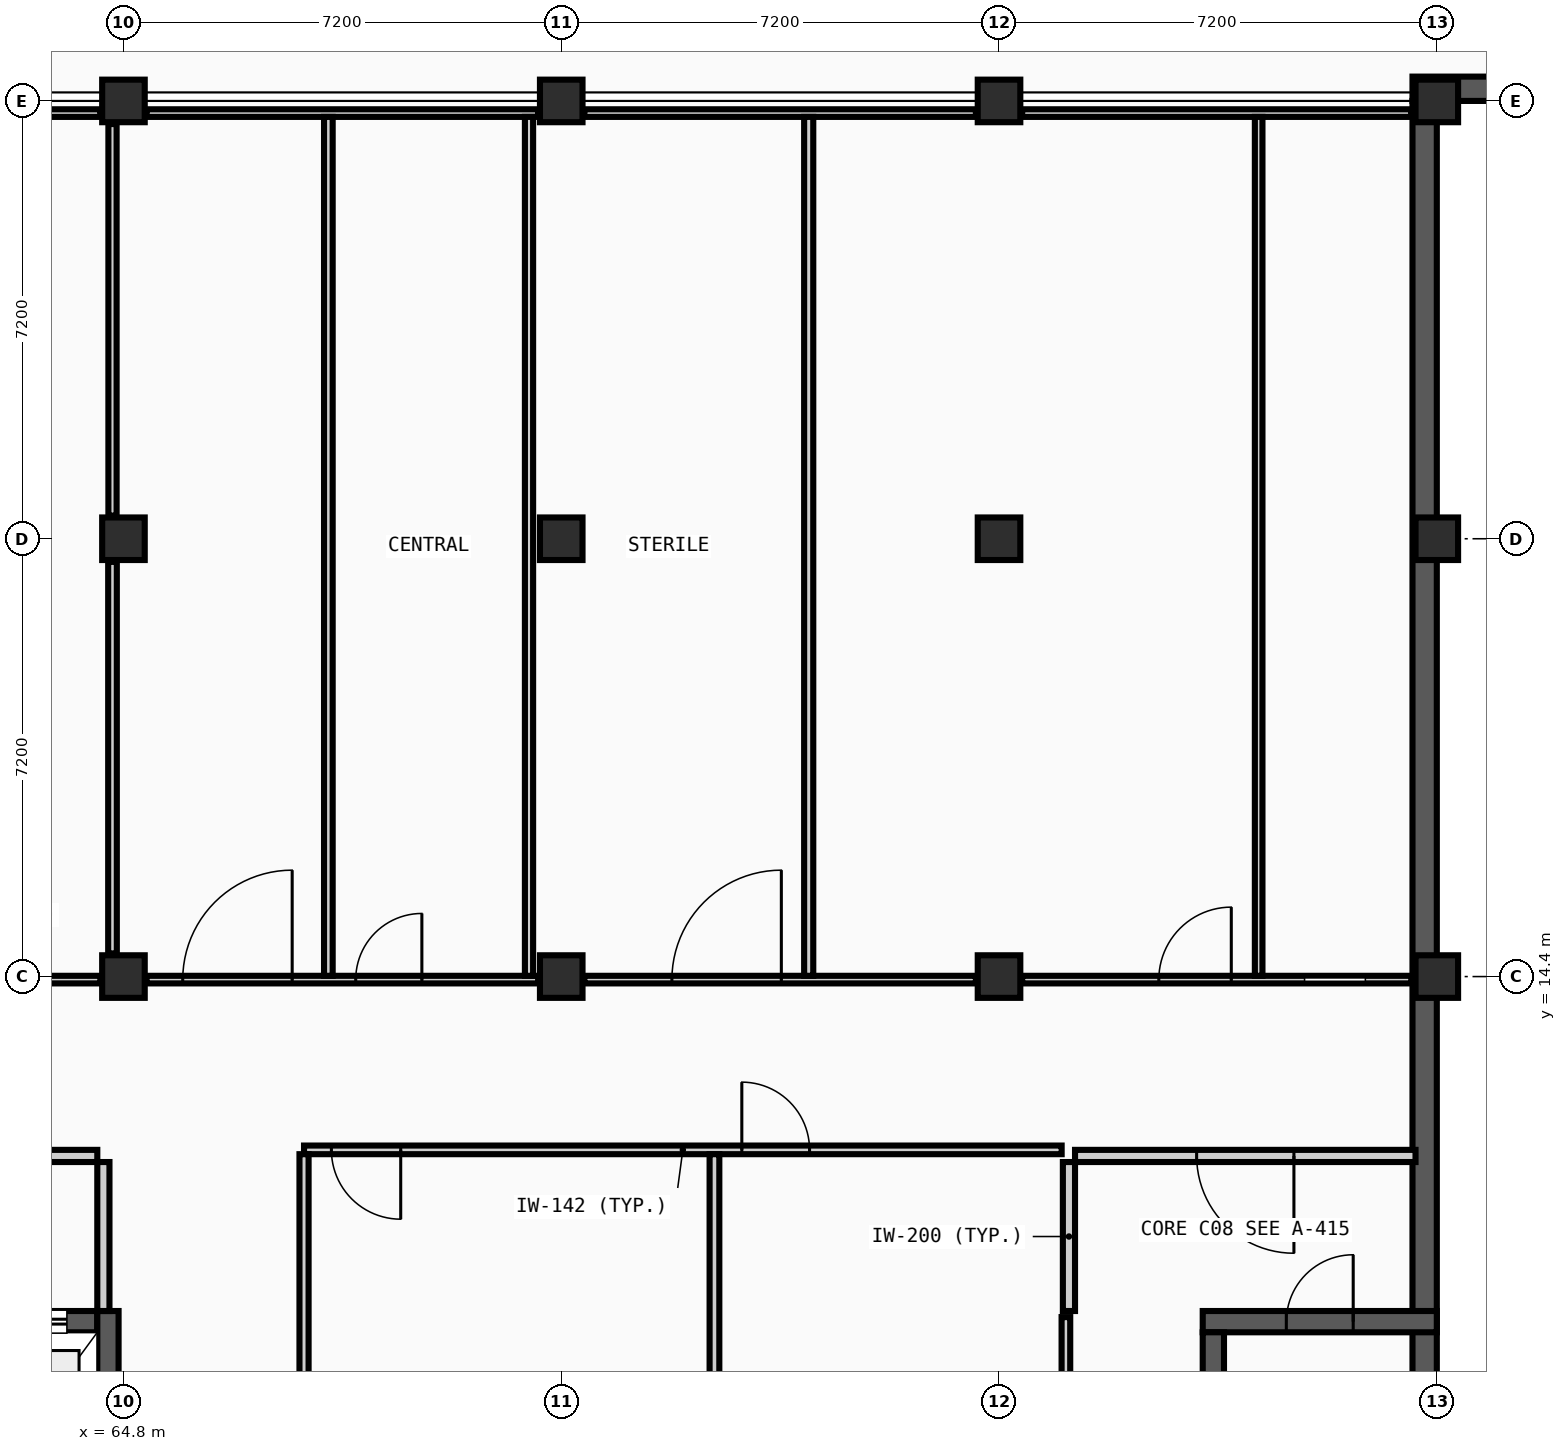
"""IFC4 building model, lengths in metres.
Left out: names, types, materials, properties, quantities, classifications, styles, units other than length and angle.
Written with IfcOpenShell. Run it as: python <this file> out.ifc"""

import sys

from ifc_helpers import new_model, si_unit, direction, frame, frame_2d, origin, origin_2d, place, context, subcontext, project, spatial, rectangle, extrude, element, fill, save


model = new_model("IFC4")
c1 = context("Model", 3, precision=1e-05, world=origin(), true_north=direction((0.0, 1.0)))
c2 = subcontext(c1, "Body", "Model", "MODEL_VIEW")
j1 = project(units=[si_unit("LENGTHUNIT", "METRE"), si_unit("PLANEANGLEUNIT", "RADIAN")], contexts=[c1])
p1 = place(None, origin())
s1 = spatial("IfcSite", under=j1, at=p1, CompositionType="ELEMENT")
p2 = place(p1, origin())
s2 = spatial("IfcBuilding", under=s1, at=p2, CompositionType="ELEMENT")
p3 = place(p2, frame((0.0, 0.0, -4.8)))
s3 = spatial("IfcBuildingStorey", under=s2, at=p3, CompositionType="ELEMENT", Elevation=-4.8)
for number, where, z_axis, x_axis in (
    (1, (64.8, 14.4, 0.0), (0.0, 0.0, 1.0), (1.0, 0.0, 0.0)),
    (2, (64.8, 21.6, 0.0), (0.0, 0.0, 1.0), (1.0, 0.0, 0.0)),
    (3, (64.8, 28.8, 0.0), (0.0, 0.0, 1.0), (1.0, 0.0, 0.0)),
    (4, (72.0, 14.4, 0.0), (0.0, 0.0, 1.0), (1.0, 0.0, 0.0)),
    (5, (72.0, 21.6, 0.0), (0.0, 0.0, 1.0), (1.0, 0.0, 0.0)),
    (6, (72.0, 28.8, 0.0), (0.0, 0.0, 1.0), (1.0, 0.0, 0.0)),
    (7, (79.2, 14.4, 0.0), (0.0, 0.0, 1.0), (1.0, 0.0, 0.0)),
    (8, (79.2, 21.6, 0.0), (0.0, 0.0, 1.0), (1.0, 0.0, 0.0)),
    (9, (79.2, 28.8, 0.0), (0.0, 0.0, 1.0), (1.0, 0.0, 0.0)),
    (10, (86.4, 14.4, 0.0), (0.0, 0.0, 1.0), (1.0, 0.0, 0.0)),
    (11, (86.4, 21.6, 0.0), (0.0, 0.0, 1.0), (1.0, 0.0, 0.0)),
    (12, (86.4, 28.8, 0.0), (0.0, 0.0, 1.0), (1.0, 0.0, 0.0)),
):
    element("IfcColumn", number, at=place(p3, frame(where, z_axis=z_axis, x_axis=x_axis)), inside=s3, PredefinedType="COLUMN", context=c2, shape_type="SweptSolid", body=[
        extrude(rectangle(XDim=0.7, YDim=0.7, at=origin_2d()), origin(), (0.0, 0.0, 1.0), 4.8),
    ])
p4 = place(p3, frame((86.2, 0.4, 0.0), z_axis=(0.0, 0.0, 1.0), x_axis=(0.0, 1.0, 0.0)))
e13 = element("IfcWall", 13, at=p4, inside=s3, PredefinedType="USERDEFINED", context=c2, shape_type="SweptSolid", body=[
    extrude(rectangle(XDim=28.4, YDim=0.4, at=frame_2d((14.2, 0.0))), origin(), (0.0, 0.0, 1.0), 4.545),
])
p5 = place(p3, frame((86.0, 29.0, 0.0), z_axis=(0.0, 0.0, 1.0), x_axis=(1.0, 0.0, 0.0)))
e14 = element("IfcWall", 14, at=p5, inside=s3, PredefinedType="USERDEFINED", context=c2, shape_type="SweptSolid", body=[
    extrude(rectangle(XDim=36.4, YDim=0.4, at=frame_2d((18.2, 0.0))), origin(), (0.0, 0.0, 1.0), 4.545),
])
p6 = place(p3, frame((62.17, 8.725, 0.0), z_axis=(0.0, 0.0, 1.0), x_axis=(1.0, 0.0, 0.0)))
e15 = element("IfcWall", 15, at=p6, inside=s3, PredefinedType="SHEAR", context=c2, shape_type="SweptSolid", body=[
    extrude(rectangle(XDim=2.2, YDim=0.35, at=frame_2d((1.1, 0.0))), origin(), (0.0, 0.0, 1.0), 4.545),
])
p7 = place(p6, frame((0.5, 0.0, 0.0)))
e16 = element("IfcOpeningElement", 16, at=p7, cuts=e15, PredefinedType="OPENING", context=c2, shape_type="SweptSolid", body=[
    extrude(rectangle(XDim=1.2, YDim=2.2, at=frame_2d((0.6, 1.1))), frame((0.0, 0.185, 0.0), z_axis=(0.0, -1.0, 0.0), x_axis=(1.0, 0.0, 0.0)), (0.0, 0.0, 1.0), 0.37),
])
p8 = place(p3, frame((64.545, 5.2, 0.0), z_axis=(0.0, 0.0, 1.0), x_axis=(0.0, 1.0, 0.0)))
e17 = element("IfcWall", 17, at=p8, inside=s3, PredefinedType="SHEAR", context=c2, shape_type="SweptSolid", body=[
    extrude(rectangle(XDim=3.7, YDim=0.35, at=frame_2d((1.85, 0.0))), origin(), (0.0, 0.0, 1.0), 4.545),
])
p9 = place(p3, frame((58.67, 11.45, 0.0), z_axis=(0.0, 0.0, 1.0), x_axis=(1.0, 0.0, 0.0)))
e18 = element("IfcWall", 18, at=p9, inside=s3, PredefinedType="PARTITIONING", context=c2, shape_type="SweptSolid", body=[
    extrude(rectangle(XDim=5.7, YDim=0.2, at=frame_2d((2.85, 0.0))), origin(), (0.0, 0.0, 1.0), 4.545),
])
p10 = place(p9, frame((2.05, 0.0, 0.0)))
e19 = element("IfcOpeningElement", 19, at=p10, cuts=e18, PredefinedType="OPENING", context=c2, shape_type="SweptSolid", body=[
    extrude(rectangle(XDim=1.6, YDim=2.2, at=frame_2d((0.8, 1.1))), frame((0.0, 0.11, 0.0), z_axis=(0.0, -1.0, 0.0), x_axis=(1.0, 0.0, 0.0)), (0.0, 0.0, 1.0), 0.22),
])
p11 = place(p3, frame((64.47, 8.9, 0.0), z_axis=(0.0, 0.0, 1.0), x_axis=(0.0, 1.0, 0.0)))
e20 = element("IfcWall", 20, at=p11, inside=s3, PredefinedType="PARTITIONING", context=c2, shape_type="SweptSolid", body=[
    extrude(rectangle(XDim=2.45, YDim=0.2, at=frame_2d((1.225, 0.0))), origin(), (0.0, 0.0, 1.0), 4.545),
])
p12 = place(p3, frame((82.55, 8.725, 0.0), z_axis=(0.0, 0.0, 1.0), x_axis=(1.0, 0.0, 0.0)))
e21 = element("IfcWall", 21, at=p12, inside=s3, PredefinedType="SHEAR", context=c2, shape_type="SweptSolid", body=[
    extrude(rectangle(XDim=3.85, YDim=0.35, at=frame_2d((1.925, 0.0))), origin(), (0.0, 0.0, 1.0), 4.545),
])
p13 = place(p12, frame((1.375, 0.0, 0.0)))
e22 = element("IfcOpeningElement", 22, at=p13, cuts=e21, PredefinedType="OPENING", context=c2, shape_type="SweptSolid", body=[
    extrude(rectangle(XDim=1.1, YDim=2.15, at=frame_2d((0.55, 1.075))), frame((0.0, 0.185, 0.0), z_axis=(0.0, -1.0, 0.0), x_axis=(1.0, 0.0, 0.0)), (0.0, 0.0, 1.0), 0.37),
])
p14 = place(p3, frame((82.725, 0.75, 0.0), z_axis=(0.0, 0.0, 1.0), x_axis=(0.0, 1.0, 0.0)))
e23 = element("IfcWall", 23, at=p14, inside=s3, PredefinedType="SHEAR", context=c2, shape_type="SweptSolid", body=[
    extrude(rectangle(XDim=7.8, YDim=0.35, at=frame_2d((3.9, 0.0))), origin(), (0.0, 0.0, 1.0), 4.545),
])
p15 = place(p3, frame((80.45, 11.45, 0.0), z_axis=(0.0, 0.0, 1.0), x_axis=(1.0, 0.0, 0.0)))
e24 = element("IfcWall", 24, at=p15, inside=s3, PredefinedType="PARTITIONING", context=c2, shape_type="SweptSolid", body=[
    extrude(rectangle(XDim=5.6, YDim=0.2, at=frame_2d((2.8, 0.0))), origin(), (0.0, 0.0, 1.0), 4.545),
])
p16 = place(p15, frame((2.0, 0.0, 0.0)))
e25 = element("IfcOpeningElement", 25, at=p16, cuts=e24, PredefinedType="OPENING", context=c2, shape_type="SweptSolid", body=[
    extrude(rectangle(XDim=1.6, YDim=2.2, at=frame_2d((0.8, 1.1))), frame((0.0, 0.11, 0.0), z_axis=(0.0, -1.0, 0.0), x_axis=(1.0, 0.0, 0.0)), (0.0, 0.0, 1.0), 0.22),
])
p17 = place(p3, frame((80.35, 8.9, 0.0), z_axis=(0.0, 0.0, 1.0), x_axis=(0.0, 1.0, 0.0)))
e26 = element("IfcWall", 26, at=p17, inside=s3, PredefinedType="PARTITIONING", context=c2, shape_type="SweptSolid", body=[
    extrude(rectangle(XDim=2.45, YDim=0.2, at=frame_2d((1.225, 0.0))), origin(), (0.0, 0.0, 1.0), 4.545),
])
p18 = place(p3, frame((67.77, 11.55, 0.0), z_axis=(0.0, 0.0, 1.0), x_axis=(1.0, 0.0, 0.0)))
e27 = element("IfcWall", 27, at=p18, inside=s3, PredefinedType="PARTITIONING", context=c2, shape_type="SweptSolid", body=[
    extrude(rectangle(XDim=12.46, YDim=0.142, at=frame_2d((6.23, 0.0))), origin(), (0.0, 0.0, 1.0), 4.545),
])
p19 = place(p18, frame((7.2, 0.0, 0.0)))
e28 = element("IfcOpeningElement", 28, at=p19, cuts=e27, PredefinedType="OPENING", context=c2, shape_type="SweptSolid", body=[
    extrude(rectangle(XDim=1.114, YDim=2.04, at=frame_2d((0.557, 1.02))), frame((0.0, 0.081, 0.0), z_axis=(0.0, -1.0, 0.0), x_axis=(1.0, 0.0, 0.0)), (0.0, 0.0, 1.0), 0.162),
])
p20 = place(p18, frame((0.45, 0.0, 0.0)))
e29 = element("IfcOpeningElement", 29, at=p20, cuts=e27, PredefinedType="OPENING", context=c2, shape_type="SweptSolid", body=[
    extrude(rectangle(XDim=1.14, YDim=2.04, at=frame_2d((0.57, 1.02))), frame((0.0, 0.081, 0.0), z_axis=(0.0, -1.0, 0.0), x_axis=(1.0, 0.0, 0.0)), (0.0, 0.0, 1.0), 0.162),
])
p21 = place(p3, frame((58.7, 14.35, 0.0), z_axis=(0.0, 0.0, 1.0), x_axis=(1.0, 0.0, 0.0)))
e30 = element("IfcWall", 30, at=p21, inside=s3, PredefinedType="PARTITIONING", context=c2, shape_type="SweptSolid", body=[
    extrude(rectangle(XDim=5.72, YDim=0.125, at=frame_2d((2.86, 0.0))), origin(), (0.0, 0.0, 1.0), 4.095),
])
p22 = place(p21, frame((2.277, 0.0, 0.0)))
e31 = element("IfcOpeningElement", 31, at=p22, cuts=e30, PredefinedType="OPENING", context=c2, shape_type="SweptSolid", body=[
    extrude(rectangle(XDim=1.166, YDim=2.04, at=frame_2d((0.583, 1.02))), frame((0.0, 0.073, 0.0), z_axis=(0.0, -1.0, 0.0), x_axis=(1.0, 0.0, 0.0)), (0.0, 0.0, 1.0), 0.145),
])
p23 = place(p3, frame((65.18, 14.35, 0.0), z_axis=(0.0, 0.0, 1.0), x_axis=(1.0, 0.0, 0.0)))
e32 = element("IfcWall", 32, at=p23, inside=s3, PredefinedType="PARTITIONING", context=c2, shape_type="SweptSolid", body=[
    extrude(rectangle(XDim=6.44, YDim=0.125, at=frame_2d((3.22, 0.0))), origin(), (0.0, 0.0, 1.0), 4.095),
])
p24 = place(p23, frame((3.44, 0.0, 0.0)))
e33 = element("IfcOpeningElement", 33, at=p24, cuts=e32, PredefinedType="OPENING", context=c2, shape_type="SweptSolid", body=[
    extrude(rectangle(XDim=1.088, YDim=2.04, at=frame_2d((0.544, 1.02))), frame((0.0, 0.073, 0.0), z_axis=(0.0, -1.0, 0.0), x_axis=(1.0, 0.0, 0.0)), (0.0, 0.0, 1.0), 0.145),
])
p25 = place(p23, frame((0.595, 0.0, 0.0)))
e34 = element("IfcOpeningElement", 34, at=p25, cuts=e32, PredefinedType="OPENING", context=c2, shape_type="SweptSolid", body=[
    extrude(rectangle(XDim=1.8, YDim=2.3, at=frame_2d((0.9, 1.15))), frame((0.0, 0.073, 0.0), z_axis=(0.0, -1.0, 0.0), x_axis=(1.0, 0.0, 0.0)), (0.0, 0.0, 1.0), 0.145),
])
p26 = place(p3, frame((72.38, 14.35, 0.0), z_axis=(0.0, 0.0, 1.0), x_axis=(1.0, 0.0, 0.0)))
e35 = element("IfcWall", 35, at=p26, inside=s3, PredefinedType="PARTITIONING", context=c2, shape_type="SweptSolid", body=[
    extrude(rectangle(XDim=6.44, YDim=0.125, at=frame_2d((3.22, 0.0))), origin(), (0.0, 0.0, 1.0), 4.095),
])
p27 = place(p26, frame((1.44, 0.0, 0.0)))
e36 = element("IfcOpeningElement", 36, at=p27, cuts=e35, PredefinedType="OPENING", context=c2, shape_type="SweptSolid", body=[
    extrude(rectangle(XDim=1.8, YDim=2.3, at=frame_2d((0.9, 1.15))), frame((0.0, 0.073, 0.0), z_axis=(0.0, -1.0, 0.0), x_axis=(1.0, 0.0, 0.0)), (0.0, 0.0, 1.0), 0.145),
])
p28 = place(p3, frame((79.58, 14.35, 0.0), z_axis=(0.0, 0.0, 1.0), x_axis=(1.0, 0.0, 0.0)))
e37 = element("IfcWall", 37, at=p28, inside=s3, PredefinedType="PARTITIONING", context=c2, shape_type="SweptSolid", body=[
    extrude(rectangle(XDim=6.4, YDim=0.125, at=frame_2d((3.2, 0.0))), origin(), (0.0, 0.0, 1.0), 4.095),
])
p29 = place(p28, frame((4.645, 0.0, 0.0)))
e38 = element("IfcOpeningElement", 38, at=p29, cuts=e37, PredefinedType="OPENING", context=c2, shape_type="SweptSolid", body=[
    extrude(rectangle(XDim=1.0, YDim=2.1, at=frame_2d((0.5, 1.05))), frame((0.0, 0.073, 0.0), z_axis=(0.0, -1.0, 0.0), x_axis=(1.0, 0.0, 0.0)), (0.0, 0.0, 1.0), 0.145),
])
p30 = place(p28, frame((2.248, 0.0, 0.0)))
e39 = element("IfcOpeningElement", 39, at=p30, cuts=e37, PredefinedType="OPENING", context=c2, shape_type="SweptSolid", body=[
    extrude(rectangle(XDim=1.192, YDim=2.04, at=frame_2d((0.596, 1.02))), frame((0.0, 0.073, 0.0), z_axis=(0.0, -1.0, 0.0), x_axis=(1.0, 0.0, 0.0)), (0.0, 0.0, 1.0), 0.145),
])
p31 = place(p3, frame((58.7, 28.6, 0.0), z_axis=(0.0, 0.0, 1.0), x_axis=(1.0, 0.0, 0.0)))
e40 = element("IfcWall", 40, at=p31, inside=s3, PredefinedType="PARTITIONING", context=c2, shape_type="SweptSolid", body=[
    extrude(rectangle(XDim=5.72, YDim=0.125, at=frame_2d((2.86, 0.0))), origin(), (0.0, 0.0, 1.0), 4.095),
])
for number, where, z_axis, x_axis in (
    (41, (65.18, 28.6, 0.0), (0.0, 0.0, 1.0), (1.0, 0.0, 0.0)),
    (42, (72.38, 28.6, 0.0), (0.0, 0.0, 1.0), (1.0, 0.0, 0.0)),
):
    element("IfcWall", number, at=place(p3, frame(where, z_axis=z_axis, x_axis=x_axis)), inside=s3, PredefinedType="PARTITIONING", context=c2, shape_type="SweptSolid", body=[
        extrude(rectangle(XDim=6.44, YDim=0.125, at=frame_2d((3.22, 0.0))), origin(), (0.0, 0.0, 1.0), 4.095),
    ])
p32 = place(p3, frame((79.58, 28.6, 0.0), z_axis=(0.0, 0.0, 1.0), x_axis=(1.0, 0.0, 0.0)))
e43 = element("IfcWall", 43, at=p32, inside=s3, PredefinedType="PARTITIONING", context=c2, shape_type="SweptSolid", body=[
    extrude(rectangle(XDim=6.4, YDim=0.125, at=frame_2d((3.2, 0.0))), origin(), (0.0, 0.0, 1.0), 4.095),
])
p33 = place(p3, frame((64.62, 14.78, 0.0), z_axis=(0.0, 0.0, 1.0), x_axis=(0.0, 1.0, 0.0)))
e44 = element("IfcWall", 44, at=p33, inside=s3, PredefinedType="PARTITIONING", context=c2, shape_type="SweptSolid", body=[
    extrude(rectangle(XDim=6.44, YDim=0.142, at=frame_2d((3.22, 0.0))), origin(), (0.0, 0.0, 1.0), 4.245),
])
p34 = place(p3, frame((64.62, 21.98, 0.0), z_axis=(0.0, 0.0, 1.0), x_axis=(0.0, 1.0, 0.0)))
e45 = element("IfcWall", 45, at=p34, inside=s3, PredefinedType="PARTITIONING", context=c2, shape_type="SweptSolid", body=[
    extrude(rectangle(XDim=6.44, YDim=0.135, at=frame_2d((3.22, 0.0))), origin(), (0.0, 0.0, 1.0), 4.245),
])
p35 = place(p3, frame((67.77, 3.36, 0.0), z_axis=(0.0, 0.0, 1.0), x_axis=(0.0, 1.0, 0.0)))
e46 = element("IfcWall", 46, at=p35, inside=s3, PredefinedType="PARTITIONING", context=c2, shape_type="SweptSolid", body=[
    extrude(rectangle(XDim=8.119, YDim=0.15, at=frame_2d((4.06, 0.0))), origin(), (0.0, 0.0, 1.0), 4.545),
])
p36 = place(p3, frame((68.17, 14.413, 0.0), z_axis=(0.0, 0.0, 1.0), x_axis=(0.0, 1.0, 0.0)))
e47 = element("IfcWall", 47, at=p36, inside=s3, PredefinedType="PARTITIONING", context=c2, shape_type="SweptSolid", body=[
    extrude(rectangle(XDim=14.125, YDim=0.142, at=frame_2d((7.062, 0.0))), origin(), (0.0, 0.0, 1.0), 4.545),
])
p37 = place(p3, frame((71.47, 14.413, 0.0), z_axis=(0.0, 0.0, 1.0), x_axis=(0.0, 1.0, 0.0)))
e48 = element("IfcWall", 48, at=p37, inside=s3, PredefinedType="PARTITIONING", context=c2, shape_type="SweptSolid", body=[
    extrude(rectangle(XDim=14.125, YDim=0.135, at=frame_2d((7.062, 0.0))), origin(), (0.0, 0.0, 1.0), 4.545),
])
p38 = place(p3, frame((74.52, 0.4, 0.0), z_axis=(0.0, 0.0, 1.0), x_axis=(0.0, 1.0, 0.0)))
e49 = element("IfcWall", 49, at=p38, inside=s3, PredefinedType="PARTITIONING", context=c2, shape_type="SweptSolid", body=[
    extrude(rectangle(XDim=11.079, YDim=0.16, at=frame_2d((5.54, 0.0))), origin(), (0.0, 0.0, 1.0), 4.235),
])
p39 = place(p3, frame((76.07, 14.413, 0.0), z_axis=(0.0, 0.0, 1.0), x_axis=(0.0, 1.0, 0.0)))
e50 = element("IfcWall", 50, at=p39, inside=s3, PredefinedType="PARTITIONING", context=c2, shape_type="SweptSolid", body=[
    extrude(rectangle(XDim=14.125, YDim=0.15, at=frame_2d((7.062, 0.0))), origin(), (0.0, 0.0, 1.0), 4.545),
])
p40 = place(p3, frame((80.3, 0.4, 0.0), z_axis=(0.0, 0.0, 1.0), x_axis=(0.0, 1.0, 0.0)))
e51 = element("IfcWall", 51, at=p40, inside=s3, PredefinedType="PARTITIONING", context=c2, shape_type="SweptSolid", body=[
    extrude(rectangle(XDim=8.4, YDim=0.142, at=frame_2d((4.2, 0.0))), origin(), (0.0, 0.0, 1.0), 4.545),
])
p41 = place(p3, frame((83.47, 14.413, 0.0), z_axis=(0.0, 0.0, 1.0), x_axis=(0.0, 1.0, 0.0)))
e52 = element("IfcWall", 52, at=p41, inside=s3, PredefinedType="PARTITIONING", context=c2, shape_type="SweptSolid", body=[
    extrude(rectangle(XDim=14.125, YDim=0.125, at=frame_2d((7.062, 0.0))), origin(), (0.0, 0.0, 1.0), 4.545),
])
p42 = place(p7, origin())
e53 = element("IfcDoor", 53, at=p42, inside=s3, OperationType="SLIDING_TO_RIGHT", PredefinedType="DOOR", context=c2, shape_type="SweptSolid", body=[
    extrude(rectangle(XDim=1.2, YDim=2.2, at=frame_2d((0.6, 1.1))), frame((0.0, 0.025, 0.0), z_axis=(0.0, -1.0, 0.0), x_axis=(1.0, 0.0, 0.0)), (0.0, 0.0, 1.0), 0.05),
])
fill(e16, e53)
p43 = place(p13, frame((1.1, 0.0, 0.0), z_axis=(0.0, 0.0, 1.0), x_axis=(-1.0, 0.0, 0.0)))
e54 = element("IfcDoor", 54, at=p43, inside=s3, OperationType="SINGLE_SWING_RIGHT", PredefinedType="DOOR", context=c2, shape_type="SweptSolid", body=[
    extrude(rectangle(XDim=1.1, YDim=2.15, at=frame_2d((0.55, 1.075))), frame((0.0, 0.025, 0.0), z_axis=(0.0, -1.0, 0.0), x_axis=(1.0, 0.0, 0.0)), (0.0, 0.0, 1.0), 0.05),
])
fill(e22, e54)
p44 = place(p16, origin())
e55 = element("IfcDoor", 55, at=p44, inside=s3, OperationType="DOUBLE_DOOR_SINGLE_SWING", PredefinedType="DOOR", context=c2, shape_type="SweptSolid", body=[
    extrude(rectangle(XDim=1.6, YDim=2.2, at=frame_2d((0.8, 1.1))), frame((0.0, 0.025, 0.0), z_axis=(0.0, -1.0, 0.0), x_axis=(1.0, 0.0, 0.0)), (0.0, 0.0, 1.0), 0.05),
])
fill(e25, e55)
p45 = place(p29, frame((1.0, 0.0, 0.0), z_axis=(0.0, 0.0, 1.0), x_axis=(-1.0, 0.0, 0.0)))
e56 = element("IfcDoor", 56, at=p45, inside=s3, OperationType="SLIDING_TO_LEFT", PredefinedType="DOOR", context=c2, shape_type="SweptSolid", body=[
    extrude(rectangle(XDim=1.0, YDim=2.1, at=frame_2d((0.5, 1.05))), frame((0.0, 0.025, 0.0), z_axis=(0.0, -1.0, 0.0), x_axis=(1.0, 0.0, 0.0)), (0.0, 0.0, 1.0), 0.05),
])
fill(e38, e56)
p46 = place(p24, frame((1.088, 0.0, 0.0), z_axis=(0.0, 0.0, 1.0), x_axis=(-1.0, 0.0, 0.0)))
e57 = element("IfcDoor", 57, at=p46, inside=s3, OperationType="SINGLE_SWING_RIGHT", PredefinedType="DOOR", context=c2, shape_type="SweptSolid", body=[
    extrude(rectangle(XDim=1.088, YDim=2.04, at=frame_2d((0.544, 1.02))), frame((0.0, 0.025, 0.0), z_axis=(0.0, -1.0, 0.0), x_axis=(1.0, 0.0, 0.0)), (0.0, 0.0, 1.0), 0.05),
])
fill(e33, e57)
p47 = place(p25, frame((1.8, 0.0, 0.0), z_axis=(0.0, 0.0, 1.0), x_axis=(-1.0, 0.0, 0.0)))
e58 = element("IfcDoor", 58, at=p47, inside=s3, OperationType="DOUBLE_DOOR_SINGLE_SWING", PredefinedType="DOOR", context=c2, shape_type="SweptSolid", body=[
    extrude(rectangle(XDim=1.8, YDim=2.3, at=frame_2d((0.9, 1.15))), frame((0.0, 0.025, 0.0), z_axis=(0.0, -1.0, 0.0), x_axis=(1.0, 0.0, 0.0)), (0.0, 0.0, 1.0), 0.05),
])
fill(e34, e58)
p48 = place(p27, frame((1.8, 0.0, 0.0), z_axis=(0.0, 0.0, 1.0), x_axis=(-1.0, 0.0, 0.0)))
e59 = element("IfcDoor", 59, at=p48, inside=s3, OperationType="DOUBLE_DOOR_SINGLE_SWING", PredefinedType="DOOR", context=c2, shape_type="SweptSolid", body=[
    extrude(rectangle(XDim=1.8, YDim=2.3, at=frame_2d((0.9, 1.15))), frame((0.0, 0.025, 0.0), z_axis=(0.0, -1.0, 0.0), x_axis=(1.0, 0.0, 0.0)), (0.0, 0.0, 1.0), 0.05),
])
fill(e36, e59)
p49 = place(p19, origin())
e60 = element("IfcDoor", 60, at=p49, inside=s3, OperationType="SINGLE_SWING_LEFT", PredefinedType="DOOR", context=c2, shape_type="SweptSolid", body=[
    extrude(rectangle(XDim=1.114, YDim=2.04, at=frame_2d((0.557, 1.02))), frame((0.0, 0.025, 0.0), z_axis=(0.0, -1.0, 0.0), x_axis=(1.0, 0.0, 0.0)), (0.0, 0.0, 1.0), 0.05),
])
fill(e28, e60)
p50 = place(p20, origin())
e61 = element("IfcDoor", 61, at=p50, inside=s3, OperationType="SINGLE_SWING_RIGHT", PredefinedType="DOOR", context=c2, shape_type="SweptSolid", body=[
    extrude(rectangle(XDim=1.14, YDim=2.04, at=frame_2d((0.57, 1.02))), frame((0.0, 0.025, 0.0), z_axis=(0.0, -1.0, 0.0), x_axis=(1.0, 0.0, 0.0)), (0.0, 0.0, 1.0), 0.05),
])
fill(e29, e61)
p51 = place(p30, frame((1.192, 0.0, 0.0), z_axis=(0.0, 0.0, 1.0), x_axis=(-1.0, 0.0, 0.0)))
e62 = element("IfcDoor", 62, at=p51, inside=s3, OperationType="SINGLE_SWING_RIGHT", PredefinedType="DOOR", context=c2, shape_type="SweptSolid", body=[
    extrude(rectangle(XDim=1.192, YDim=2.04, at=frame_2d((0.596, 1.02))), frame((0.0, 0.025, 0.0), z_axis=(0.0, -1.0, 0.0), x_axis=(1.0, 0.0, 0.0)), (0.0, 0.0, 1.0), 0.05),
])
fill(e39, e62)
save(model, sys.argv[1])
